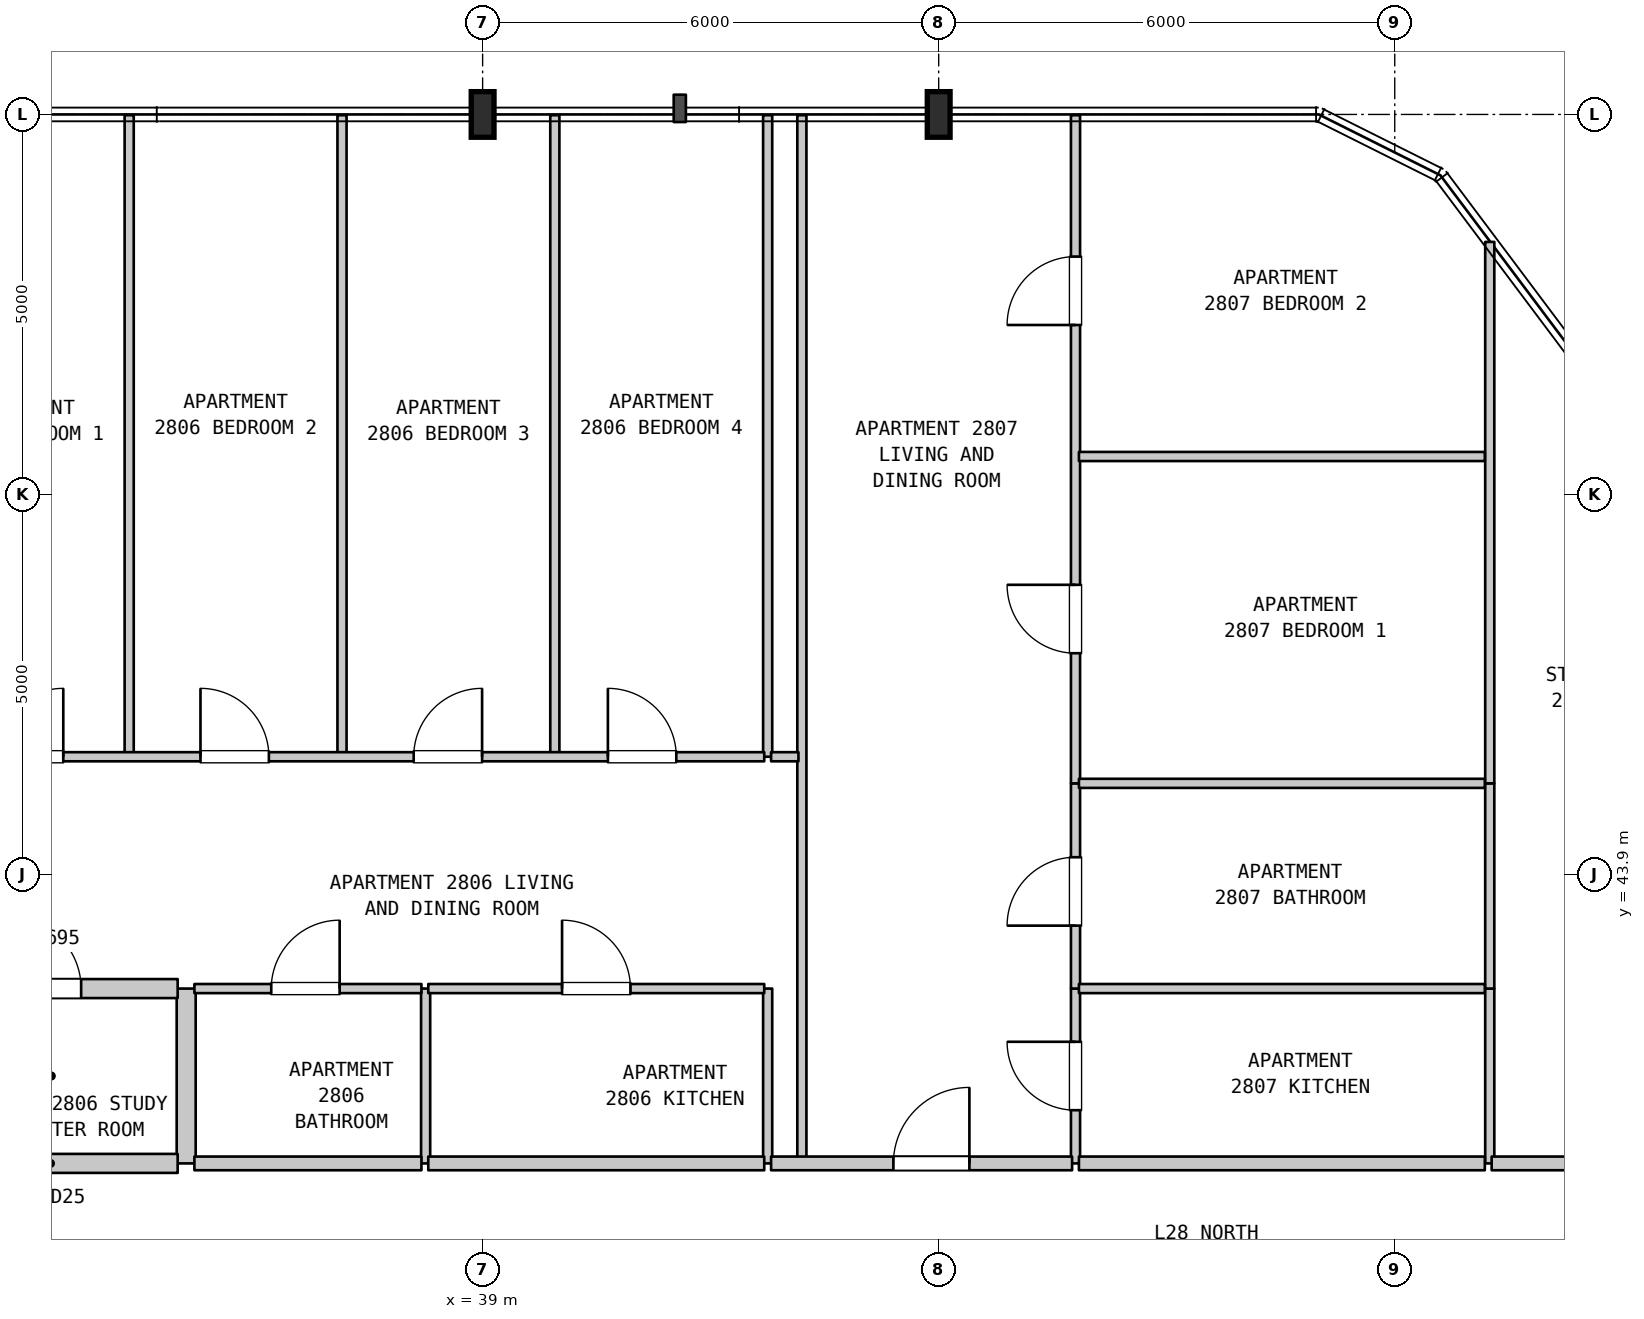
"""IFC4 building model, lengths in metres.
Left out: names, types, materials, properties, quantities, classifications, styles, units other than length and angle.
Written with IfcOpenShell. Run it as: python <this file> out.ifc"""

import sys

from ifc_helpers import new_model, si_unit, direction, frame, frame_2d, origin, origin_2d, place, context, subcontext, project, spatial, rectangle, i_section, extrude, element, fill, save


model = new_model("IFC4")
c1 = context("Model", 3, precision=1e-05, world=origin(), true_north=direction((0.0, 1.0)))
c2 = subcontext(c1, "Body", "Model", "MODEL_VIEW")
j1 = project(units=[si_unit("LENGTHUNIT", "METRE"), si_unit("PLANEANGLEUNIT", "RADIAN")], contexts=[c1])
p1 = place(None, origin())
s1 = spatial("IfcSite", under=j1, at=p1, CompositionType="ELEMENT")
p2 = place(p1, origin())
s2 = spatial("IfcBuilding", under=s1, at=p2, CompositionType="ELEMENT")
p3 = place(p2, frame((0.0, 0.0, 116.8)))
s3 = spatial("IfcBuildingStorey", under=s2, at=p3, CompositionType="ELEMENT", Elevation=116.8)
for number, where, z_axis, x_axis in (
    (1, (39.0, 53.9, 0.0), (0.0, 0.0, 1.0), (1.0, 0.0, 0.0)),
    (2, (45.0, 53.9, 0.0), (0.0, 0.0, 1.0), (1.0, 0.0, 0.0)),
):
    element("IfcColumn", number, at=place(p3, frame(where, z_axis=z_axis, x_axis=x_axis)), inside=s3, PredefinedType="COLUMN", context=c2, shape_type="SweptSolid", body=[
        extrude(i_section(OverallWidth=0.3, OverallDepth=0.6, WebThickness=0.015, FlangeThickness=0.03, FilletRadius=0.027, at=origin_2d()), origin(), (0.0, 0.0, 1.0), 3.7),
    ])
p4 = place(p3, frame((34.35, 45.45, 0.0), z_axis=(0.0, 0.0, 1.0), x_axis=(0.0, 1.0, 0.0)))
e3 = element("IfcWall", 3, at=p4, inside=s3, PredefinedType="PARTITIONING", context=c2, shape_type="SweptSolid", body=[
    extrude(rectangle(XDim=8.44, YDim=0.12, at=frame_2d((4.22, 0.0))), origin(), (0.0, 0.0, 1.0), 3.38),
])
p5 = place(p3, frame((35.1, 40.1, 0.0), z_axis=(0.0, 0.0, 1.0), x_axis=(0.0, 1.0, 0.0)))
e4 = element("IfcWall", 4, at=p5, inside=s3, PredefinedType="STANDARD", context=c2, shape_type="SweptSolid", body=[
    extrude(rectangle(XDim=2.3, YDim=0.25, at=frame_2d((1.15, 0.0))), origin(), (0.0, 0.0, 1.0), 3.38),
])
p6 = place(p3, frame((37.15, 45.45, 0.0), z_axis=(0.0, 0.0, 1.0), x_axis=(0.0, 1.0, 0.0)))
e5 = element("IfcWall", 5, at=p6, inside=s3, PredefinedType="PARTITIONING", context=c2, shape_type="SweptSolid", body=[
    extrude(rectangle(XDim=8.44, YDim=0.12, at=frame_2d((4.22, 0.0))), origin(), (0.0, 0.0, 1.0), 3.38),
])
p7 = place(p3, frame((38.25, 40.1, 0.0), z_axis=(0.0, 0.0, 1.0), x_axis=(0.0, 1.0, 0.0)))
e6 = element("IfcWall", 6, at=p7, inside=s3, PredefinedType="PARTITIONING", context=c2, shape_type="SweptSolid", body=[
    extrude(rectangle(XDim=2.3, YDim=0.12, at=frame_2d((1.15, 0.0))), origin(), (0.0, 0.0, 1.0), 3.38),
])
p8 = place(p3, frame((39.95, 45.45, 0.0), z_axis=(0.0, 0.0, 1.0), x_axis=(0.0, 1.0, 0.0)))
e7 = element("IfcWall", 7, at=p8, inside=s3, PredefinedType="PARTITIONING", context=c2, shape_type="SweptSolid", body=[
    extrude(rectangle(XDim=8.44, YDim=0.12, at=frame_2d((4.22, 0.0))), origin(), (0.0, 0.0, 1.0), 3.38),
])
p9 = place(p3, frame((42.75, 40.1, 0.0), z_axis=(0.0, 0.0, 1.0), x_axis=(0.0, 1.0, 0.0)))
e8 = element("IfcWall", 8, at=p9, inside=s3, PredefinedType="PARTITIONING", context=c2, shape_type="SweptSolid", body=[
    extrude(rectangle(XDim=2.3, YDim=0.12, at=frame_2d((1.15, 0.0))), origin(), (0.0, 0.0, 1.0), 3.38),
])
p10 = place(p3, frame((42.75, 45.45, 0.0), z_axis=(0.0, 0.0, 1.0), x_axis=(0.0, 1.0, 0.0)))
e9 = element("IfcWall", 9, at=p10, inside=s3, PredefinedType="PARTITIONING", context=c2, shape_type="SweptSolid", body=[
    extrude(rectangle(XDim=8.44, YDim=0.12, at=frame_2d((4.22, 0.0))), origin(), (0.0, 0.0, 1.0), 3.38),
])
p11 = place(p3, frame((43.2, 40.1, 0.0), z_axis=(0.0, 0.0, 1.0), x_axis=(0.0, 1.0, 0.0)))
e10 = element("IfcWall", 10, at=p11, inside=s3, PredefinedType="PARTITIONING", context=c2, shape_type="SweptSolid", body=[
    extrude(rectangle(XDim=13.79, YDim=0.12, at=frame_2d((6.895, 0.0))), origin(), (0.0, 0.0, 1.0), 3.38),
])
p12 = place(p3, frame((46.8, 40.1, 0.0), z_axis=(0.0, 0.0, 1.0), x_axis=(0.0, 1.0, 0.0)))
e11 = element("IfcWall", 11, at=p12, inside=s3, PredefinedType="PARTITIONING", context=c2, shape_type="SweptSolid", body=[
    extrude(rectangle(XDim=2.3, YDim=0.12, at=frame_2d((1.15, 0.0))), origin(), (0.0, 0.0, 1.0), 3.38),
])
p13 = place(p12, frame((0.7, 0.0, 0.0)))
e12 = element("IfcOpeningElement", 12, at=p13, cuts=e11, PredefinedType="OPENING", context=c2, shape_type="SweptSolid", body=[
    extrude(rectangle(XDim=0.9, YDim=2.15, at=frame_2d((0.45, 1.075))), frame((0.0, 0.07, 0.0), z_axis=(0.0, -1.0, 0.0), x_axis=(1.0, 0.0, 0.0)), (0.0, 0.0, 1.0), 0.14),
])
p14 = place(p3, frame((46.8, 42.4, 0.0), z_axis=(0.0, 0.0, 1.0), x_axis=(0.0, 1.0, 0.0)))
e13 = element("IfcWall", 13, at=p14, inside=s3, PredefinedType="PARTITIONING", context=c2, shape_type="SweptSolid", body=[
    extrude(rectangle(XDim=2.7, YDim=0.12, at=frame_2d((1.35, 0.0))), origin(), (0.0, 0.0, 1.0), 3.38),
])
p15 = place(p14, frame((0.828, 0.0, 0.0)))
e14 = element("IfcOpeningElement", 14, at=p15, cuts=e13, PredefinedType="OPENING", context=c2, shape_type="SweptSolid", body=[
    extrude(rectangle(XDim=0.9, YDim=2.1, at=frame_2d((0.45, 1.05))), frame((0.0, 0.07, 0.0), z_axis=(0.0, -1.0, 0.0), x_axis=(1.0, 0.0, 0.0)), (0.0, 0.0, 1.0), 0.14),
])
p16 = place(p3, frame((46.8, 45.1, 0.0), z_axis=(0.0, 0.0, 1.0), x_axis=(0.0, 1.0, 0.0)))
e15 = element("IfcWall", 15, at=p16, inside=s3, PredefinedType="PARTITIONING", context=c2, shape_type="SweptSolid", body=[
    extrude(rectangle(XDim=8.79, YDim=0.12, at=frame_2d((4.395, 0.0))), origin(), (0.0, 0.0, 1.0), 3.38),
])
p17 = place(p16, frame((1.712, 0.0, 0.0)))
e16 = element("IfcOpeningElement", 16, at=p17, cuts=e15, PredefinedType="OPENING", context=c2, shape_type="SweptSolid", body=[
    extrude(rectangle(XDim=0.9, YDim=2.15, at=frame_2d((0.45, 1.075))), frame((0.0, 0.07, 0.0), z_axis=(0.0, -1.0, 0.0), x_axis=(1.0, 0.0, 0.0)), (0.0, 0.0, 1.0), 0.14),
])
p18 = place(p16, frame((6.03, 0.0, 0.0)))
e17 = element("IfcOpeningElement", 17, at=p18, cuts=e15, PredefinedType="OPENING", context=c2, shape_type="SweptSolid", body=[
    extrude(rectangle(XDim=0.9, YDim=2.15, at=frame_2d((0.45, 1.075))), frame((0.0, 0.07, 0.0), z_axis=(0.0, -1.0, 0.0), x_axis=(1.0, 0.0, 0.0)), (0.0, 0.0, 1.0), 0.14),
])
p19 = place(p3, frame((52.25, 40.1, 0.0), z_axis=(0.0, 0.0, 1.0), x_axis=(0.0, 1.0, 0.0)))
e18 = element("IfcWall", 18, at=p19, inside=s3, PredefinedType="PARTITIONING", context=c2, shape_type="SweptSolid", body=[
    extrude(rectangle(XDim=2.3, YDim=0.12, at=frame_2d((1.15, 0.0))), origin(), (0.0, 0.0, 1.0), 3.38),
])
p20 = place(p3, frame((52.25, 42.4, 0.0), z_axis=(0.0, 0.0, 1.0), x_axis=(0.0, 1.0, 0.0)))
e19 = element("IfcWall", 19, at=p20, inside=s3, PredefinedType="PARTITIONING", context=c2, shape_type="SweptSolid", body=[
    extrude(rectangle(XDim=2.7, YDim=0.12, at=frame_2d((1.35, 0.0))), origin(), (0.0, 0.0, 1.0), 3.38),
])
p21 = place(p3, frame((52.25, 45.1, 0.0), z_axis=(0.0, 0.0, 1.0), x_axis=(0.0, 1.0, 0.0)))
e20 = element("IfcWall", 20, at=p21, inside=s3, PredefinedType="PARTITIONING", context=c2, shape_type="SweptSolid", body=[
    extrude(rectangle(XDim=7.123, YDim=0.12, at=frame_2d((3.562, 0.0))), origin(), (0.0, 0.0, 1.0), 3.38),
])
p22 = place(p3, frame((31.64, 40.1, 0.0), z_axis=(0.0, 0.0, 1.0), x_axis=(1.0, 0.0, 0.0)))
e21 = element("IfcWall", 21, at=p22, inside=s3, PredefinedType="STANDARD", context=c2, shape_type="SweptSolid", body=[
    extrude(rectangle(XDim=3.348, YDim=0.25, at=frame_2d((1.674, 0.0))), origin(), (0.0, 0.0, 1.0), 3.38),
])
p23 = place(p3, frame((35.208, 40.1, 0.0), z_axis=(0.0, 0.0, 1.0), x_axis=(1.0, 0.0, 0.0)))
e22 = element("IfcWall", 22, at=p23, inside=s3, PredefinedType="STANDARD", context=c2, shape_type="SweptSolid", body=[
    extrude(rectangle(XDim=2.987, YDim=0.18, at=frame_2d((1.494, 0.0))), origin(), (0.0, 0.0, 1.0), 3.38),
])
p24 = place(p3, frame((38.285, 40.1, 0.0), z_axis=(0.0, 0.0, 1.0), x_axis=(1.0, 0.0, 0.0)))
e23 = element("IfcWall", 23, at=p24, inside=s3, PredefinedType="STANDARD", context=c2, shape_type="SweptSolid", body=[
    extrude(rectangle(XDim=4.42, YDim=0.18, at=frame_2d((2.21, 0.0))), origin(), (0.0, 0.0, 1.0), 3.38),
])
p25 = place(p3, frame((42.795, 40.1, 0.0), z_axis=(0.0, 0.0, 1.0), x_axis=(1.0, 0.0, 0.0)))
e24 = element("IfcWall", 24, at=p25, inside=s3, PredefinedType="STANDARD", context=c2, shape_type="SweptSolid", body=[
    extrude(rectangle(XDim=3.96, YDim=0.18, at=frame_2d((1.98, 0.0))), origin(), (0.0, 0.0, 1.0), 3.38),
])
p26 = place(p25, frame((1.609, 0.0, 0.0)))
e25 = element("IfcOpeningElement", 25, at=p26, cuts=e24, PredefinedType="OPENING", context=c2, shape_type="SweptSolid", body=[
    extrude(rectangle(XDim=1.0, YDim=2.15, at=frame_2d((0.5, 1.075))), frame((0.0, 0.1, 0.0), z_axis=(0.0, -1.0, 0.0), x_axis=(1.0, 0.0, 0.0)), (0.0, 0.0, 1.0), 0.2),
])
p27 = place(p3, frame((46.845, 40.1, 0.0), z_axis=(0.0, 0.0, 1.0), x_axis=(1.0, 0.0, 0.0)))
e26 = element("IfcWall", 26, at=p27, inside=s3, PredefinedType="STANDARD", context=c2, shape_type="SweptSolid", body=[
    extrude(rectangle(XDim=5.34, YDim=0.18, at=frame_2d((2.67, 0.0))), origin(), (0.0, 0.0, 1.0), 3.38),
])
p28 = place(p3, frame((52.275, 40.1, 0.0), z_axis=(0.0, 0.0, 1.0), x_axis=(1.0, 0.0, 0.0)))
e27 = element("IfcWall", 27, at=p28, inside=s3, PredefinedType="STANDARD", context=c2, shape_type="SweptSolid", body=[
    extrude(rectangle(XDim=3.51, YDim=0.18, at=frame_2d((1.755, 0.0))), origin(), (0.0, 0.0, 1.0), 3.38),
])
p29 = place(p28, frame((1.185, 0.0, 0.0)))
e28 = element("IfcOpeningElement", 28, at=p29, cuts=e27, PredefinedType="OPENING", context=c2, shape_type="SweptSolid", body=[
    extrude(rectangle(XDim=1.0, YDim=2.15, at=frame_2d((0.5, 1.075))), frame((0.0, 0.1, 0.0), z_axis=(0.0, -1.0, 0.0), x_axis=(1.0, 0.0, 0.0)), (0.0, 0.0, 1.0), 0.2),
])
p30 = place(p3, frame((31.64, 42.4, 0.0), z_axis=(0.0, 0.0, 1.0), x_axis=(1.0, 0.0, 0.0)))
e29 = element("IfcWall", 29, at=p30, inside=s3, PredefinedType="STANDARD", context=c2, shape_type="SweptSolid", body=[
    extrude(rectangle(XDim=3.348, YDim=0.25, at=frame_2d((1.674, 0.0))), origin(), (0.0, 0.0, 1.0), 3.38),
])
p31 = place(p30, frame((1.128, 0.0, 0.0)))
e30 = element("IfcOpeningElement", 30, at=p31, cuts=e29, PredefinedType="OPENING", context=c2, shape_type="SweptSolid", body=[
    extrude(rectangle(XDim=0.95, YDim=2.15, at=frame_2d((0.475, 1.075))), frame((0.0, 0.135, 0.0), z_axis=(0.0, -1.0, 0.0), x_axis=(1.0, 0.0, 0.0)), (0.0, 0.0, 1.0), 0.27),
])
p32 = place(p3, frame((35.208, 42.4, 0.0), z_axis=(0.0, 0.0, 1.0), x_axis=(1.0, 0.0, 0.0)))
e31 = element("IfcWall", 31, at=p32, inside=s3, PredefinedType="PARTITIONING", context=c2, shape_type="SweptSolid", body=[
    extrude(rectangle(XDim=2.987, YDim=0.12, at=frame_2d((1.494, 0.0))), origin(), (0.0, 0.0, 1.0), 3.38),
])
p33 = place(p32, frame((1.011, 0.0, 0.0)))
e32 = element("IfcOpeningElement", 32, at=p33, cuts=e31, PredefinedType="OPENING", context=c2, shape_type="SweptSolid", body=[
    extrude(rectangle(XDim=0.9, YDim=2.1, at=frame_2d((0.45, 1.05))), frame((0.0, 0.07, 0.0), z_axis=(0.0, -1.0, 0.0), x_axis=(1.0, 0.0, 0.0)), (0.0, 0.0, 1.0), 0.14),
])
p34 = place(p3, frame((38.285, 42.4, 0.0), z_axis=(0.0, 0.0, 1.0), x_axis=(1.0, 0.0, 0.0)))
e33 = element("IfcWall", 33, at=p34, inside=s3, PredefinedType="PARTITIONING", context=c2, shape_type="SweptSolid", body=[
    extrude(rectangle(XDim=4.42, YDim=0.12, at=frame_2d((2.21, 0.0))), origin(), (0.0, 0.0, 1.0), 3.38),
])
p35 = place(p34, frame((1.76, 0.0, 0.0)))
e34 = element("IfcOpeningElement", 34, at=p35, cuts=e33, PredefinedType="OPENING", context=c2, shape_type="SweptSolid", body=[
    extrude(rectangle(XDim=0.9, YDim=2.15, at=frame_2d((0.45, 1.075))), frame((0.0, 0.07, 0.0), z_axis=(0.0, -1.0, 0.0), x_axis=(1.0, 0.0, 0.0)), (0.0, 0.0, 1.0), 0.14),
])
for number, where, z_axis, x_axis in (
    (35, (46.845, 42.4, 0.0), (0.0, 0.0, 1.0), (1.0, 0.0, 0.0)),
    (36, (46.845, 45.1, 0.0), (0.0, 0.0, 1.0), (1.0, 0.0, 0.0)),
):
    element("IfcWall", number, at=place(p3, frame(where, z_axis=z_axis, x_axis=x_axis)), inside=s3, PredefinedType="PARTITIONING", context=c2, shape_type="SweptSolid", body=[
        extrude(rectangle(XDim=5.34, YDim=0.12, at=frame_2d((2.67, 0.0))), origin(), (0.0, 0.0, 1.0), 3.38),
    ])
p36 = place(p3, frame((31.575, 45.45, 0.0), z_axis=(0.0, 0.0, 1.0), x_axis=(1.0, 0.0, 0.0)))
e37 = element("IfcWall", 37, at=p36, inside=s3, PredefinedType="PARTITIONING", context=c2, shape_type="SweptSolid", body=[
    extrude(rectangle(XDim=11.13, YDim=0.12, at=frame_2d((5.565, 0.0))), origin(), (0.0, 0.0, 1.0), 3.38),
])
p37 = place(p36, frame((1.008, 0.0, 0.0)))
e38 = element("IfcOpeningElement", 38, at=p37, cuts=e37, PredefinedType="OPENING", context=c2, shape_type="SweptSolid", body=[
    extrude(rectangle(XDim=0.9, YDim=2.15, at=frame_2d((0.45, 1.075))), frame((0.0, 0.07, 0.0), z_axis=(0.0, -1.0, 0.0), x_axis=(1.0, 0.0, 0.0)), (0.0, 0.0, 1.0), 0.14),
])
p38 = place(p36, frame((3.713, 0.0, 0.0)))
e39 = element("IfcOpeningElement", 39, at=p38, cuts=e37, PredefinedType="OPENING", context=c2, shape_type="SweptSolid", body=[
    extrude(rectangle(XDim=0.9, YDim=2.15, at=frame_2d((0.45, 1.075))), frame((0.0, 0.07, 0.0), z_axis=(0.0, -1.0, 0.0), x_axis=(1.0, 0.0, 0.0)), (0.0, 0.0, 1.0), 0.14),
])
p39 = place(p36, frame((6.518, 0.0, 0.0)))
e40 = element("IfcOpeningElement", 40, at=p39, cuts=e37, PredefinedType="OPENING", context=c2, shape_type="SweptSolid", body=[
    extrude(rectangle(XDim=0.9, YDim=2.15, at=frame_2d((0.45, 1.075))), frame((0.0, 0.07, 0.0), z_axis=(0.0, -1.0, 0.0), x_axis=(1.0, 0.0, 0.0)), (0.0, 0.0, 1.0), 0.14),
])
p40 = place(p36, frame((9.073, 0.0, 0.0)))
e41 = element("IfcOpeningElement", 41, at=p40, cuts=e37, PredefinedType="OPENING", context=c2, shape_type="SweptSolid", body=[
    extrude(rectangle(XDim=0.9, YDim=2.15, at=frame_2d((0.45, 1.075))), frame((0.0, 0.07, 0.0), z_axis=(0.0, -1.0, 0.0), x_axis=(1.0, 0.0, 0.0)), (0.0, 0.0, 1.0), 0.14),
])
p41 = place(p3, frame((42.795, 45.45, 0.0), z_axis=(0.0, 0.0, 1.0), x_axis=(1.0, 0.0, 0.0)))
e42 = element("IfcWall", 42, at=p41, inside=s3, PredefinedType="PARTITIONING", context=c2, shape_type="SweptSolid", body=[
    extrude(rectangle(XDim=0.36, YDim=0.12, at=frame_2d((0.18, 0.0))), origin(), (0.0, 0.0, 1.0), 3.38),
])
p42 = place(p3, frame((46.845, 49.4, 0.0), z_axis=(0.0, 0.0, 1.0), x_axis=(1.0, 0.0, 0.0)))
e43 = element("IfcWall", 43, at=p42, inside=s3, PredefinedType="PARTITIONING", context=c2, shape_type="SweptSolid", body=[
    extrude(rectangle(XDim=5.34, YDim=0.12, at=frame_2d((2.67, 0.0))), origin(), (0.0, 0.0, 1.0), 3.38),
])
p43 = place(p13, origin())
e44 = element("IfcDoor", 44, at=p43, inside=s3, OperationType="SINGLE_SWING_RIGHT", PredefinedType="DOOR", context=c2, shape_type="SweptSolid", body=[
    extrude(rectangle(XDim=0.9, YDim=2.15, at=frame_2d((0.45, 1.075))), frame((0.0, 0.025, 0.0), z_axis=(0.0, -1.0, 0.0), x_axis=(1.0, 0.0, 0.0)), (0.0, 0.0, 1.0), 0.05),
])
fill(e12, e44)
p44 = place(p15, origin())
e45 = element("IfcDoor", 45, at=p44, inside=s3, OperationType="SINGLE_SWING_LEFT", PredefinedType="DOOR", context=c2, shape_type="SweptSolid", body=[
    extrude(rectangle(XDim=0.9, YDim=2.1, at=frame_2d((0.45, 1.05))), frame((0.0, 0.025, 0.0), z_axis=(0.0, -1.0, 0.0), x_axis=(1.0, 0.0, 0.0)), (0.0, 0.0, 1.0), 0.05),
])
fill(e14, e45)
p45 = place(p17, origin())
e46 = element("IfcDoor", 46, at=p45, inside=s3, OperationType="SINGLE_SWING_RIGHT", PredefinedType="DOOR", context=c2, shape_type="SweptSolid", body=[
    extrude(rectangle(XDim=0.9, YDim=2.15, at=frame_2d((0.45, 1.075))), frame((0.0, 0.025, 0.0), z_axis=(0.0, -1.0, 0.0), x_axis=(1.0, 0.0, 0.0)), (0.0, 0.0, 1.0), 0.05),
])
fill(e16, e46)
p46 = place(p18, origin())
e47 = element("IfcDoor", 47, at=p46, inside=s3, OperationType="SINGLE_SWING_LEFT", PredefinedType="DOOR", context=c2, shape_type="SweptSolid", body=[
    extrude(rectangle(XDim=0.9, YDim=2.15, at=frame_2d((0.45, 1.075))), frame((0.0, 0.025, 0.0), z_axis=(0.0, -1.0, 0.0), x_axis=(1.0, 0.0, 0.0)), (0.0, 0.0, 1.0), 0.05),
])
fill(e17, e47)
p47 = place(p26, origin())
e48 = element("IfcDoor", 48, at=p47, inside=s3, OperationType="SINGLE_SWING_RIGHT", PredefinedType="DOOR", context=c2, shape_type="SweptSolid", body=[
    extrude(rectangle(XDim=1.0, YDim=2.15, at=frame_2d((0.5, 1.075))), frame((0.0, 0.025, 0.0), z_axis=(0.0, -1.0, 0.0), x_axis=(1.0, 0.0, 0.0)), (0.0, 0.0, 1.0), 0.05),
])
fill(e25, e48)
p48 = place(p31, origin())
e49 = element("IfcDoor", 49, at=p48, inside=s3, OperationType="SINGLE_SWING_LEFT", PredefinedType="DOOR", context=c2, shape_type="SweptSolid", body=[
    extrude(rectangle(XDim=0.95, YDim=2.15, at=frame_2d((0.475, 1.075))), frame((0.0, 0.025, 0.0), z_axis=(0.0, -1.0, 0.0), x_axis=(1.0, 0.0, 0.0)), (0.0, 0.0, 1.0), 0.05),
])
fill(e30, e49)
p49 = place(p33, origin())
e50 = element("IfcDoor", 50, at=p49, inside=s3, OperationType="SINGLE_SWING_RIGHT", PredefinedType="DOOR", context=c2, shape_type="SweptSolid", body=[
    extrude(rectangle(XDim=0.9, YDim=2.1, at=frame_2d((0.45, 1.05))), frame((0.0, 0.025, 0.0), z_axis=(0.0, -1.0, 0.0), x_axis=(1.0, 0.0, 0.0)), (0.0, 0.0, 1.0), 0.05),
])
fill(e32, e50)
p50 = place(p35, origin())
e51 = element("IfcDoor", 51, at=p50, inside=s3, OperationType="SINGLE_SWING_LEFT", PredefinedType="DOOR", context=c2, shape_type="SweptSolid", body=[
    extrude(rectangle(XDim=0.9, YDim=2.15, at=frame_2d((0.45, 1.075))), frame((0.0, 0.025, 0.0), z_axis=(0.0, -1.0, 0.0), x_axis=(1.0, 0.0, 0.0)), (0.0, 0.0, 1.0), 0.05),
])
fill(e34, e51)
p51 = place(p37, origin())
e52 = element("IfcDoor", 52, at=p51, inside=s3, OperationType="SINGLE_SWING_RIGHT", PredefinedType="DOOR", context=c2, shape_type="SweptSolid", body=[
    extrude(rectangle(XDim=0.9, YDim=2.15, at=frame_2d((0.45, 1.075))), frame((0.0, 0.025, 0.0), z_axis=(0.0, -1.0, 0.0), x_axis=(1.0, 0.0, 0.0)), (0.0, 0.0, 1.0), 0.05),
])
fill(e38, e52)
p52 = place(p38, origin())
e53 = element("IfcDoor", 53, at=p52, inside=s3, OperationType="SINGLE_SWING_LEFT", PredefinedType="DOOR", context=c2, shape_type="SweptSolid", body=[
    extrude(rectangle(XDim=0.9, YDim=2.15, at=frame_2d((0.45, 1.075))), frame((0.0, 0.025, 0.0), z_axis=(0.0, -1.0, 0.0), x_axis=(1.0, 0.0, 0.0)), (0.0, 0.0, 1.0), 0.05),
])
fill(e39, e53)
p53 = place(p39, origin())
e54 = element("IfcDoor", 54, at=p53, inside=s3, OperationType="SINGLE_SWING_RIGHT", PredefinedType="DOOR", context=c2, shape_type="SweptSolid", body=[
    extrude(rectangle(XDim=0.9, YDim=2.15, at=frame_2d((0.45, 1.075))), frame((0.0, 0.025, 0.0), z_axis=(0.0, -1.0, 0.0), x_axis=(1.0, 0.0, 0.0)), (0.0, 0.0, 1.0), 0.05),
])
fill(e40, e54)
p54 = place(p40, origin())
e55 = element("IfcDoor", 55, at=p54, inside=s3, OperationType="SINGLE_SWING_LEFT", PredefinedType="DOOR", context=c2, shape_type="SweptSolid", body=[
    extrude(rectangle(XDim=0.9, YDim=2.15, at=frame_2d((0.45, 1.075))), frame((0.0, 0.025, 0.0), z_axis=(0.0, -1.0, 0.0), x_axis=(1.0, 0.0, 0.0)), (0.0, 0.0, 1.0), 0.05),
])
fill(e41, e55)
save(model, sys.argv[1])
